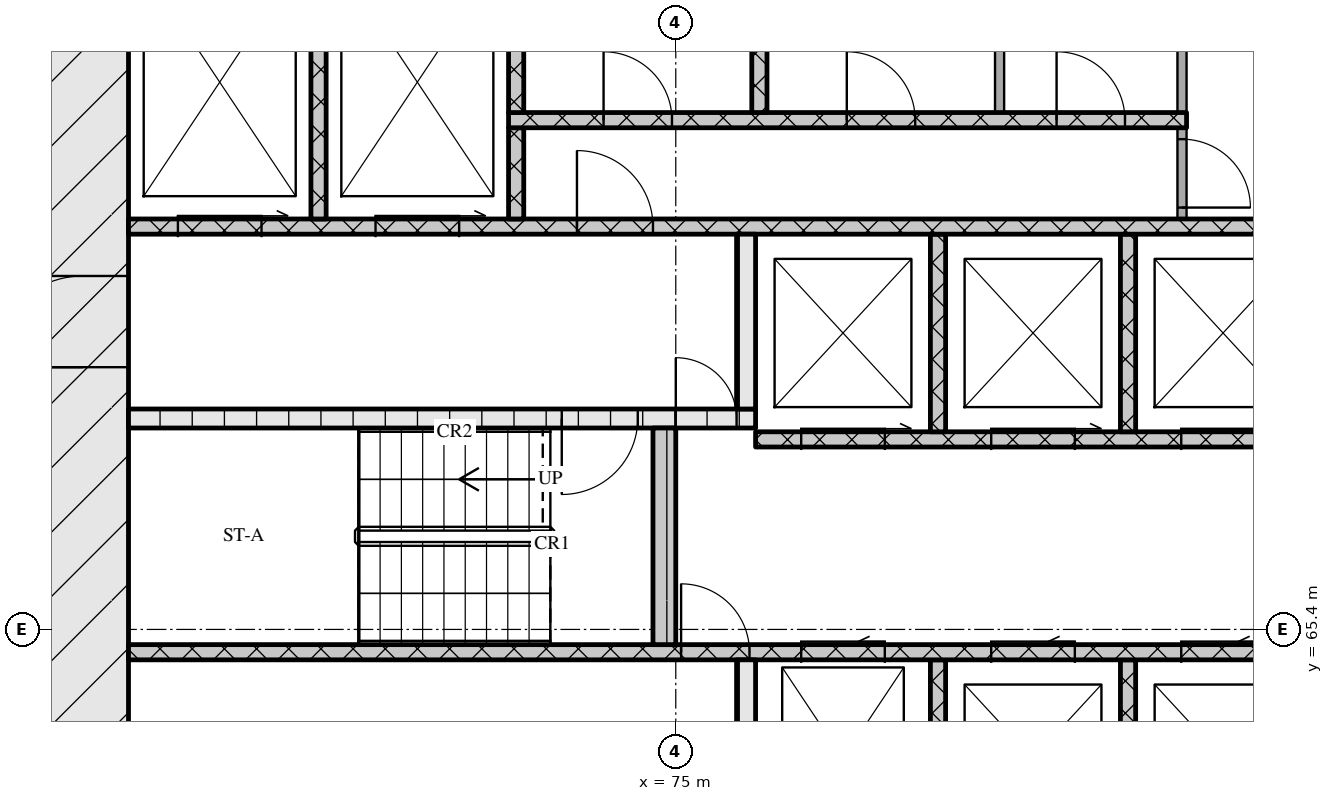
"""IFC4 building model, lengths in metres.
Left out: names, types, materials, properties, quantities, classifications, styles, units other than length and angle.
Written with IfcOpenShell. Run it as: python <this file> out.ifc"""

import sys

from ifc_helpers import new_model, si_unit, direction, frame, frame_2d, origin, place, context, subcontext, project, spatial, rectangle, extrude, element, fill, save


model = new_model("IFC4")
c1 = context("Model", 3, precision=1e-05, world=origin(), true_north=direction((0.0, 1.0)))
c2 = subcontext(c1, "Body", "Model", "MODEL_VIEW")
j1 = project(units=[si_unit("LENGTHUNIT", "METRE"), si_unit("PLANEANGLEUNIT", "RADIAN")], contexts=[c1])
p1 = place(None, origin())
s1 = spatial("IfcSite", under=j1, at=p1, CompositionType="ELEMENT")
p2 = place(p1, origin())
s2 = spatial("IfcBuilding", under=s1, at=p2, CompositionType="ELEMENT")
p3 = place(p2, frame((0.0, 0.0, 40.8)))
s3 = spatial("IfcBuildingStorey", under=s2, at=p3, CompositionType="ELEMENT", Elevation=40.8)
p4 = place(p3, frame((67.2, 62.4, 0.0), z_axis=(0.0, 0.0, 1.0), x_axis=(0.0, 1.0, 0.0)))
e1 = element("IfcWall", 1, at=p4, inside=s3, PredefinedType="SOLIDWALL", context=c2, shape_type="SweptSolid", body=[
    extrude(rectangle(XDim=12.0, YDim=1.2, at=frame_2d((6.0, 0.0))), origin(), (0.0, 0.0, 1.0), 3.32),
])
p5 = place(p4, frame((6.45, 0.0, 0.0)))
e2 = element("IfcOpeningElement", 2, at=p5, cuts=e1, PredefinedType="OPENING", context=c2, shape_type="SweptSolid", body=[
    extrude(rectangle(XDim=1.2, YDim=2.1, at=frame_2d((0.6, 1.05))), frame((0.0, 0.61, 0.0), z_axis=(0.0, -1.0, 0.0), x_axis=(1.0, 0.0, 0.0)), (0.0, 0.0, 1.0), 1.22),
])
p6 = place(p3, frame((75.925, 62.4, 0.0), z_axis=(0.0, 0.0, 1.0), x_axis=(0.0, 1.0, 0.0)))
e3 = element("IfcWall", 3, at=p6, inside=s3, PredefinedType="SOLIDWALL", context=c2, shape_type="SweptSolid", body=[
    extrude(rectangle(XDim=2.6, YDim=0.25, at=frame_2d((1.3, 0.0))), origin(), (0.0, 0.0, 1.0), 3.32),
])
for number, where, z_axis, x_axis in (
    (4, (78.45, 62.4, 0.0), (0.0, 0.0, 1.0), (0.0, 1.0, 0.0)),
    (5, (80.95, 62.4, 0.0), (0.0, 0.0, 1.0), (0.0, 1.0, 0.0)),
):
    element("IfcWall", number, at=place(p3, frame(where, z_axis=z_axis, x_axis=x_axis)), inside=s3, PredefinedType="SOLIDWALL", context=c2, shape_type="SweptSolid", body=[
        extrude(rectangle(XDim=2.6, YDim=0.2, at=frame_2d((1.3, 0.0))), origin(), (0.0, 0.0, 1.0), 3.32),
    ])
p7 = place(p3, frame((67.8, 65.1, 0.0), z_axis=(0.0, 0.0, 1.0), x_axis=(1.0, 0.0, 0.0)))
e6 = element("IfcWall", 6, at=p7, inside=s3, PredefinedType="SOLIDWALL", context=c2, shape_type="SweptSolid", body=[
    extrude(rectangle(XDim=18.5, YDim=0.2, at=frame_2d((9.25, 0.0))), origin(), (0.0, 0.0, 1.0), 3.32),
])
p8 = place(p7, frame((7.27, 0.0, 0.0)))
e7 = element("IfcOpeningElement", 7, at=p8, cuts=e6, PredefinedType="OPENING", context=c2, shape_type="SweptSolid", body=[
    extrude(rectangle(XDim=0.9, YDim=2.1, at=frame_2d((0.45, 1.05))), frame((0.0, 0.11, 0.0), z_axis=(0.0, -1.0, 0.0), x_axis=(1.0, 0.0, 0.0)), (0.0, 0.0, 1.0), 0.22),
])
p9 = place(p7, frame((8.85, 0.0, 0.0)))
e8 = element("IfcOpeningElement", 8, at=p9, cuts=e6, PredefinedType="OPENING", context=c2, shape_type="SweptSolid", body=[
    extrude(rectangle(XDim=1.1, YDim=2.1, at=frame_2d((0.55, 1.05))), frame((0.0, 0.11, 0.0), z_axis=(0.0, -1.0, 0.0), x_axis=(1.0, 0.0, 0.0)), (0.0, 0.0, 1.0), 0.22),
])
p10 = place(p7, frame((11.35, 0.0, 0.0)))
e9 = element("IfcOpeningElement", 9, at=p10, cuts=e6, PredefinedType="OPENING", context=c2, shape_type="SweptSolid", body=[
    extrude(rectangle(XDim=1.1, YDim=2.1, at=frame_2d((0.55, 1.05))), frame((0.0, 0.11, 0.0), z_axis=(0.0, -1.0, 0.0), x_axis=(1.0, 0.0, 0.0)), (0.0, 0.0, 1.0), 0.22),
])
p11 = place(p7, frame((13.85, 0.0, 0.0)))
e10 = element("IfcOpeningElement", 10, at=p11, cuts=e6, PredefinedType="OPENING", context=c2, shape_type="SweptSolid", body=[
    extrude(rectangle(XDim=1.1, YDim=2.1, at=frame_2d((0.55, 1.05))), frame((0.0, 0.11, 0.0), z_axis=(0.0, -1.0, 0.0), x_axis=(1.0, 0.0, 0.0)), (0.0, 0.0, 1.0), 0.22),
])
p12 = place(p7, frame((16.7, 0.0, 0.0)))
e11 = element("IfcOpeningElement", 11, at=p12, cuts=e6, PredefinedType="OPENING", context=c2, shape_type="SweptSolid", body=[
    extrude(rectangle(XDim=0.9, YDim=2.1, at=frame_2d((0.45, 1.05))), frame((0.0, 0.11, 0.0), z_axis=(0.0, -1.0, 0.0), x_axis=(1.0, 0.0, 0.0)), (0.0, 0.0, 1.0), 0.22),
])
p13 = place(p3, frame((74.85, 65.2, 0.0), z_axis=(0.0, 0.0, 1.0), x_axis=(0.0, 1.0, 0.0)))
e12 = element("IfcWall", 12, at=p13, inside=s3, PredefinedType="SOLIDWALL", context=c2, shape_type="SweptSolid", body=[
    extrude(rectangle(XDim=2.85, YDim=0.3, at=frame_2d((1.425, 0.0))), origin(), (0.0, 0.0, 1.0), 3.32),
])
p14 = place(p3, frame((76.05, 67.9, 0.0), z_axis=(0.0, 0.0, 1.0), x_axis=(1.0, 0.0, 0.0)))
e13 = element("IfcWall", 13, at=p14, inside=s3, PredefinedType="SOLIDWALL", context=c2, shape_type="SweptSolid", body=[
    extrude(rectangle(XDim=23.1, YDim=0.2, at=frame_2d((11.55, 0.0))), origin(), (0.0, 0.0, 1.0), 3.32),
])
p15 = place(p14, frame((0.6, 0.0, 0.0)))
e14 = element("IfcOpeningElement", 14, at=p15, cuts=e13, PredefinedType="OPENING", context=c2, shape_type="SweptSolid", body=[
    extrude(rectangle(XDim=1.1, YDim=2.1, at=frame_2d((0.55, 1.05))), frame((0.0, 0.11, 0.0), z_axis=(0.0, -1.0, 0.0), x_axis=(1.0, 0.0, 0.0)), (0.0, 0.0, 1.0), 0.22),
])
p16 = place(p14, frame((3.1, 0.0, 0.0)))
e15 = element("IfcOpeningElement", 15, at=p16, cuts=e13, PredefinedType="OPENING", context=c2, shape_type="SweptSolid", body=[
    extrude(rectangle(XDim=1.1, YDim=2.1, at=frame_2d((0.55, 1.05))), frame((0.0, 0.11, 0.0), z_axis=(0.0, -1.0, 0.0), x_axis=(1.0, 0.0, 0.0)), (0.0, 0.0, 1.0), 0.22),
])
p17 = place(p14, frame((5.6, 0.0, 0.0)))
e16 = element("IfcOpeningElement", 16, at=p17, cuts=e13, PredefinedType="OPENING", context=c2, shape_type="SweptSolid", body=[
    extrude(rectangle(XDim=1.1, YDim=2.1, at=frame_2d((0.55, 1.05))), frame((0.0, 0.11, 0.0), z_axis=(0.0, -1.0, 0.0), x_axis=(1.0, 0.0, 0.0)), (0.0, 0.0, 1.0), 0.22),
])
p18 = place(p14, frame((8.45, 0.0, 0.0)))
e17 = element("IfcOpeningElement", 17, at=p18, cuts=e13, PredefinedType="OPENING", context=c2, shape_type="SweptSolid", body=[
    extrude(rectangle(XDim=0.9, YDim=2.1, at=frame_2d((0.45, 1.05))), frame((0.0, 0.11, 0.0), z_axis=(0.0, -1.0, 0.0), x_axis=(1.0, 0.0, 0.0)), (0.0, 0.0, 1.0), 0.22),
])
p19 = place(p14, frame((10.91, 0.0, 0.0)))
e18 = element("IfcOpeningElement", 18, at=p19, cuts=e13, PredefinedType="OPENING", context=c2, shape_type="SweptSolid", body=[
    extrude(rectangle(XDim=0.9, YDim=2.1, at=frame_2d((0.45, 1.05))), frame((0.0, 0.11, 0.0), z_axis=(0.0, -1.0, 0.0), x_axis=(1.0, 0.0, 0.0)), (0.0, 0.0, 1.0), 0.22),
])
p20 = place(p14, frame((13.55, 0.0, 0.0)))
e19 = element("IfcOpeningElement", 19, at=p20, cuts=e13, PredefinedType="OPENING", context=c2, shape_type="SweptSolid", body=[
    extrude(rectangle(XDim=1.0, YDim=2.1, at=frame_2d((0.5, 1.05))), frame((0.0, 0.11, 0.0), z_axis=(0.0, -1.0, 0.0), x_axis=(1.0, 0.0, 0.0)), (0.0, 0.0, 1.0), 0.22),
])
for number, where, z_axis, x_axis in (
    (20, (78.45, 68.0, 0.0), (0.0, 0.0, 1.0), (0.0, 1.0, 0.0)),
    (21, (80.95, 68.0, 0.0), (0.0, 0.0, 1.0), (0.0, 1.0, 0.0)),
):
    element("IfcWall", number, at=place(p3, frame(where, z_axis=z_axis, x_axis=x_axis)), inside=s3, PredefinedType="SOLIDWALL", context=c2, shape_type="SweptSolid", body=[
        extrude(rectangle(XDim=2.6, YDim=0.2, at=frame_2d((1.3, 0.0))), origin(), (0.0, 0.0, 1.0), 3.32),
    ])
p21 = place(p3, frame((67.8, 68.175, 0.0), z_axis=(0.0, 0.0, 1.0), x_axis=(1.0, 0.0, 0.0)))
e22 = element("IfcWall", 22, at=p21, inside=s3, PredefinedType="SOLIDWALL", context=c2, shape_type="SweptSolid", body=[
    extrude(rectangle(XDim=8.25, YDim=0.25, at=frame_2d((4.125, 0.0))), origin(), (0.0, 0.0, 1.0), 3.32),
])
p22 = place(p21, frame((5.7, 0.0, 0.0)))
e23 = element("IfcOpeningElement", 23, at=p22, cuts=e22, PredefinedType="OPENING", context=c2, shape_type="SweptSolid", body=[
    extrude(rectangle(XDim=1.0, YDim=2.1, at=frame_2d((0.5, 1.05))), frame((0.0, 0.135, 0.0), z_axis=(0.0, -1.0, 0.0), x_axis=(1.0, 0.0, 0.0)), (0.0, 0.0, 1.0), 0.27),
])
p23 = place(p21, frame((7.2, 0.0, 0.0)))
e24 = element("IfcOpeningElement", 24, at=p23, cuts=e22, PredefinedType="OPENING", context=c2, shape_type="SweptSolid", body=[
    extrude(rectangle(XDim=0.8, YDim=2.1, at=frame_2d((0.4, 1.05))), frame((0.0, 0.135, 0.0), z_axis=(0.0, -1.0, 0.0), x_axis=(1.0, 0.0, 0.0)), (0.0, 0.0, 1.0), 0.27),
])
p24 = place(p3, frame((75.925, 68.3, 0.0), z_axis=(0.0, 0.0, 1.0), x_axis=(0.0, 1.0, 0.0)))
e25 = element("IfcWall", 25, at=p24, inside=s3, PredefinedType="SOLIDWALL", context=c2, shape_type="SweptSolid", body=[
    extrude(rectangle(XDim=2.3, YDim=0.25, at=frame_2d((1.15, 0.0))), origin(), (0.0, 0.0, 1.0), 3.32),
])
p25 = place(p3, frame((67.8, 70.7, 0.0), z_axis=(0.0, 0.0, 1.0), x_axis=(1.0, 0.0, 0.0)))
e26 = element("IfcWall", 26, at=p25, inside=s3, PredefinedType="SOLIDWALL", context=c2, shape_type="SweptSolid", body=[
    extrude(rectangle(XDim=39.6, YDim=0.2, at=frame_2d((19.8, 0.0))), origin(), (0.0, 0.0, 1.0), 3.32),
])
p26 = place(p25, frame((0.65, 0.0, 0.0)))
e27 = element("IfcOpeningElement", 27, at=p26, cuts=e26, PredefinedType="OPENING", context=c2, shape_type="SweptSolid", body=[
    extrude(rectangle(XDim=1.1, YDim=2.1, at=frame_2d((0.55, 1.05))), frame((0.0, 0.11, 0.0), z_axis=(0.0, -1.0, 0.0), x_axis=(1.0, 0.0, 0.0)), (0.0, 0.0, 1.0), 0.22),
])
p27 = place(p25, frame((3.25, 0.0, 0.0)))
e28 = element("IfcOpeningElement", 28, at=p27, cuts=e26, PredefinedType="OPENING", context=c2, shape_type="SweptSolid", body=[
    extrude(rectangle(XDim=1.1, YDim=2.1, at=frame_2d((0.55, 1.05))), frame((0.0, 0.11, 0.0), z_axis=(0.0, -1.0, 0.0), x_axis=(1.0, 0.0, 0.0)), (0.0, 0.0, 1.0), 0.22),
])
p28 = place(p25, frame((5.9, 0.0, 0.0)))
e29 = element("IfcOpeningElement", 29, at=p28, cuts=e26, PredefinedType="OPENING", context=c2, shape_type="SweptSolid", body=[
    extrude(rectangle(XDim=1.0, YDim=2.1, at=frame_2d((0.5, 1.05))), frame((0.0, 0.11, 0.0), z_axis=(0.0, -1.0, 0.0), x_axis=(1.0, 0.0, 0.0)), (0.0, 0.0, 1.0), 0.22),
])
p29 = place(p25, frame((21.7, 0.0, 0.0)))
e30 = element("IfcOpeningElement", 30, at=p29, cuts=e26, PredefinedType="OPENING", context=c2, shape_type="SweptSolid", body=[
    extrude(rectangle(XDim=1.0, YDim=2.1, at=frame_2d((0.5, 1.05))), frame((0.0, 0.11, 0.0), z_axis=(0.0, -1.0, 0.0), x_axis=(1.0, 0.0, 0.0)), (0.0, 0.0, 1.0), 0.22),
])
p30 = place(p25, frame((32.7, 0.0, 0.0)))
e31 = element("IfcOpeningElement", 31, at=p30, cuts=e26, PredefinedType="OPENING", context=c2, shape_type="SweptSolid", body=[
    extrude(rectangle(XDim=1.0, YDim=2.1, at=frame_2d((0.5, 1.05))), frame((0.0, 0.11, 0.0), z_axis=(0.0, -1.0, 0.0), x_axis=(1.0, 0.0, 0.0)), (0.0, 0.0, 1.0), 0.22),
])
p31 = place(p25, frame((35.25, 0.0, 0.0)))
e32 = element("IfcOpeningElement", 32, at=p31, cuts=e26, PredefinedType="OPENING", context=c2, shape_type="SweptSolid", body=[
    extrude(rectangle(XDim=1.1, YDim=2.1, at=frame_2d((0.55, 1.05))), frame((0.0, 0.11, 0.0), z_axis=(0.0, -1.0, 0.0), x_axis=(1.0, 0.0, 0.0)), (0.0, 0.0, 1.0), 0.22),
])
p32 = place(p25, frame((37.85, 0.0, 0.0)))
e33 = element("IfcOpeningElement", 33, at=p32, cuts=e26, PredefinedType="OPENING", context=c2, shape_type="SweptSolid", body=[
    extrude(rectangle(XDim=1.1, YDim=2.1, at=frame_2d((0.55, 1.05))), frame((0.0, 0.11, 0.0), z_axis=(0.0, -1.0, 0.0), x_axis=(1.0, 0.0, 0.0)), (0.0, 0.0, 1.0), 0.22),
])
p33 = place(p3, frame((70.3, 70.8, 0.0), z_axis=(0.0, 0.0, 1.0), x_axis=(0.0, 1.0, 0.0)))
e34 = element("IfcWall", 34, at=p33, inside=s3, PredefinedType="SOLIDWALL", context=c2, shape_type="SweptSolid", body=[
    extrude(rectangle(XDim=3.6, YDim=0.2, at=frame_2d((1.8, 0.0))), origin(), (0.0, 0.0, 1.0), 3.32),
])
p34 = place(p3, frame((72.9, 70.8, 0.0), z_axis=(0.0, 0.0, 1.0), x_axis=(0.0, 1.0, 0.0)))
e35 = element("IfcWall", 35, at=p34, inside=s3, PredefinedType="SOLIDWALL", context=c2, shape_type="SweptSolid", body=[
    extrude(rectangle(XDim=1.2, YDim=0.2, at=frame_2d((0.6, 0.0))), origin(), (0.0, 0.0, 1.0), 3.32),
])
p35 = place(p3, frame((81.66, 70.8, 0.0), z_axis=(0.0, 0.0, 1.0), x_axis=(0.0, 1.0, 0.0)))
e36 = element("IfcWall", 36, at=p35, inside=s3, PredefinedType="PARTITIONING", context=c2, shape_type="SweptSolid", body=[
    extrude(rectangle(XDim=1.2, YDim=0.12, at=frame_2d((0.6, 0.0))), origin(), (0.0, 0.0, 1.0), 3.32),
])
p36 = place(p35, frame((0.15, 0.0, 0.0)))
e37 = element("IfcOpeningElement", 37, at=p36, cuts=e36, PredefinedType="OPENING", context=c2, shape_type="SweptSolid", body=[
    extrude(rectangle(XDim=0.9, YDim=2.1, at=frame_2d((0.45, 1.05))), frame((0.0, 0.07, 0.0), z_axis=(0.0, -1.0, 0.0), x_axis=(1.0, 0.0, 0.0)), (0.0, 0.0, 1.0), 0.14),
])
p37 = place(p3, frame((72.8, 72.1, 0.0), z_axis=(0.0, 0.0, 1.0), x_axis=(1.0, 0.0, 0.0)))
e38 = element("IfcWall", 38, at=p37, inside=s3, PredefinedType="SOLIDWALL", context=c2, shape_type="SweptSolid", body=[
    extrude(rectangle(XDim=8.92, YDim=0.2, at=frame_2d((4.46, 0.0))), origin(), (0.0, 0.0, 1.0), 3.32),
])
p38 = place(p37, frame((1.25, 0.0, 0.0)))
e39 = element("IfcOpeningElement", 39, at=p38, cuts=e38, PredefinedType="OPENING", context=c2, shape_type="SweptSolid", body=[
    extrude(rectangle(XDim=0.9, YDim=2.1, at=frame_2d((0.45, 1.05))), frame((0.0, 0.11, 0.0), z_axis=(0.0, -1.0, 0.0), x_axis=(1.0, 0.0, 0.0)), (0.0, 0.0, 1.0), 0.22),
])
p39 = place(p37, frame((4.45, 0.0, 0.0)))
e40 = element("IfcOpeningElement", 40, at=p39, cuts=e38, PredefinedType="OPENING", context=c2, shape_type="SweptSolid", body=[
    extrude(rectangle(XDim=0.9, YDim=2.1, at=frame_2d((0.45, 1.05))), frame((0.0, 0.11, 0.0), z_axis=(0.0, -1.0, 0.0), x_axis=(1.0, 0.0, 0.0)), (0.0, 0.0, 1.0), 0.22),
])
p40 = place(p37, frame((7.21, 0.0, 0.0)))
e41 = element("IfcOpeningElement", 41, at=p40, cuts=e38, PredefinedType="OPENING", context=c2, shape_type="SweptSolid", body=[
    extrude(rectangle(XDim=0.9, YDim=2.1, at=frame_2d((0.45, 1.05))), frame((0.0, 0.11, 0.0), z_axis=(0.0, -1.0, 0.0), x_axis=(1.0, 0.0, 0.0)), (0.0, 0.0, 1.0), 0.22),
])
for number, where, z_axis, x_axis in (
    (42, (72.9, 72.2, 0.0), (0.0, 0.0, 1.0), (0.0, 1.0, 0.0)),
    (43, (76.1, 72.2, 0.0), (0.0, 0.0, 1.0), (0.0, 1.0, 0.0)),
):
    element("IfcWall", number, at=place(p3, frame(where, z_axis=z_axis, x_axis=x_axis)), inside=s3, PredefinedType="SOLIDWALL", context=c2, shape_type="SweptSolid", body=[
        extrude(rectangle(XDim=2.2, YDim=0.2, at=frame_2d((1.1, 0.0))), origin(), (0.0, 0.0, 1.0), 3.32),
    ])
for number, where, z_axis, x_axis in (
    (44, (79.26, 72.2, 0.0), (0.0, 0.0, 1.0), (0.0, 1.0, 0.0)),
    (45, (81.66, 72.2, 0.0), (0.0, 0.0, 1.0), (0.0, 1.0, 0.0)),
):
    element("IfcWall", number, at=place(p3, frame(where, z_axis=z_axis, x_axis=x_axis)), inside=s3, PredefinedType="PARTITIONING", context=c2, shape_type="SweptSolid", body=[
        extrude(rectangle(XDim=2.2, YDim=0.12, at=frame_2d((1.1, 0.0))), origin(), (0.0, 0.0, 1.0), 3.32),
    ])
p41 = place(p8, origin())
e46 = element("IfcDoor", 46, at=p41, inside=s3, OperationType="SINGLE_SWING_LEFT", PredefinedType="DOOR", context=c2, shape_type="SweptSolid", body=[
    extrude(rectangle(XDim=0.9, YDim=2.1, at=frame_2d((0.45, 1.05))), frame((0.0, 0.025, 0.0), z_axis=(0.0, -1.0, 0.0), x_axis=(1.0, 0.0, 0.0)), (0.0, 0.0, 1.0), 0.05),
])
fill(e7, e46)
p42 = place(p9, origin())
e47 = element("IfcDoor", 47, at=p42, inside=s3, OperationType="SLIDING_TO_LEFT", PredefinedType="DOOR", context=c2, shape_type="SweptSolid", body=[
    extrude(rectangle(XDim=1.1, YDim=2.1, at=frame_2d((0.55, 1.05))), frame((0.0, 0.025, 0.0), z_axis=(0.0, -1.0, 0.0), x_axis=(1.0, 0.0, 0.0)), (0.0, 0.0, 1.0), 0.05),
])
fill(e8, e47)
p43 = place(p10, origin())
e48 = element("IfcDoor", 48, at=p43, inside=s3, OperationType="SLIDING_TO_LEFT", PredefinedType="DOOR", context=c2, shape_type="SweptSolid", body=[
    extrude(rectangle(XDim=1.1, YDim=2.1, at=frame_2d((0.55, 1.05))), frame((0.0, 0.025, 0.0), z_axis=(0.0, -1.0, 0.0), x_axis=(1.0, 0.0, 0.0)), (0.0, 0.0, 1.0), 0.05),
])
fill(e9, e48)
p44 = place(p11, origin())
e49 = element("IfcDoor", 49, at=p44, inside=s3, OperationType="SLIDING_TO_LEFT", PredefinedType="DOOR", context=c2, shape_type="SweptSolid", body=[
    extrude(rectangle(XDim=1.1, YDim=2.1, at=frame_2d((0.55, 1.05))), frame((0.0, 0.025, 0.0), z_axis=(0.0, -1.0, 0.0), x_axis=(1.0, 0.0, 0.0)), (0.0, 0.0, 1.0), 0.05),
])
fill(e10, e49)
p45 = place(p15, origin())
e50 = element("IfcDoor", 50, at=p45, inside=s3, OperationType="SLIDING_TO_RIGHT", PredefinedType="DOOR", context=c2, shape_type="SweptSolid", body=[
    extrude(rectangle(XDim=1.1, YDim=2.1, at=frame_2d((0.55, 1.05))), frame((0.0, 0.025, 0.0), z_axis=(0.0, -1.0, 0.0), x_axis=(1.0, 0.0, 0.0)), (0.0, 0.0, 1.0), 0.05),
])
fill(e14, e50)
p46 = place(p16, origin())
e51 = element("IfcDoor", 51, at=p46, inside=s3, OperationType="SLIDING_TO_RIGHT", PredefinedType="DOOR", context=c2, shape_type="SweptSolid", body=[
    extrude(rectangle(XDim=1.1, YDim=2.1, at=frame_2d((0.55, 1.05))), frame((0.0, 0.025, 0.0), z_axis=(0.0, -1.0, 0.0), x_axis=(1.0, 0.0, 0.0)), (0.0, 0.0, 1.0), 0.05),
])
fill(e15, e51)
p47 = place(p17, origin())
e52 = element("IfcDoor", 52, at=p47, inside=s3, OperationType="SLIDING_TO_RIGHT", PredefinedType="DOOR", context=c2, shape_type="SweptSolid", body=[
    extrude(rectangle(XDim=1.1, YDim=2.1, at=frame_2d((0.55, 1.05))), frame((0.0, 0.025, 0.0), z_axis=(0.0, -1.0, 0.0), x_axis=(1.0, 0.0, 0.0)), (0.0, 0.0, 1.0), 0.05),
])
fill(e16, e52)
p48 = place(p22, origin())
e53 = element("IfcDoor", 53, at=p48, inside=s3, OperationType="SINGLE_SWING_RIGHT", PredefinedType="DOOR", context=c2, shape_type="SweptSolid", body=[
    extrude(rectangle(XDim=1.0, YDim=2.1, at=frame_2d((0.5, 1.05))), frame((0.0, 0.025, 0.0), z_axis=(0.0, -1.0, 0.0), x_axis=(1.0, 0.0, 0.0)), (0.0, 0.0, 1.0), 0.05),
])
fill(e23, e53)
p49 = place(p23, origin())
e54 = element("IfcDoor", 54, at=p49, inside=s3, OperationType="SINGLE_SWING_LEFT", PredefinedType="DOOR", context=c2, shape_type="SweptSolid", body=[
    extrude(rectangle(XDim=0.8, YDim=2.1, at=frame_2d((0.4, 1.05))), frame((0.0, 0.025, 0.0), z_axis=(0.0, -1.0, 0.0), x_axis=(1.0, 0.0, 0.0)), (0.0, 0.0, 1.0), 0.05),
])
fill(e24, e54)
p50 = place(p5, origin())
e55 = element("IfcDoor", 55, at=p50, inside=s3, OperationType="SINGLE_SWING_LEFT", PredefinedType="DOOR", context=c2, shape_type="SweptSolid", body=[
    extrude(rectangle(XDim=1.2, YDim=2.1, at=frame_2d((0.6, 1.05))), frame((0.0, 0.025, 0.0), z_axis=(0.0, -1.0, 0.0), x_axis=(1.0, 0.0, 0.0)), (0.0, 0.0, 1.0), 0.05),
])
fill(e2, e55)
p51 = place(p26, origin())
e56 = element("IfcDoor", 56, at=p51, inside=s3, OperationType="SLIDING_TO_RIGHT", PredefinedType="DOOR", context=c2, shape_type="SweptSolid", body=[
    extrude(rectangle(XDim=1.1, YDim=2.1, at=frame_2d((0.55, 1.05))), frame((0.0, 0.025, 0.0), z_axis=(0.0, -1.0, 0.0), x_axis=(1.0, 0.0, 0.0)), (0.0, 0.0, 1.0), 0.05),
])
fill(e27, e56)
p52 = place(p27, origin())
e57 = element("IfcDoor", 57, at=p52, inside=s3, OperationType="SLIDING_TO_RIGHT", PredefinedType="DOOR", context=c2, shape_type="SweptSolid", body=[
    extrude(rectangle(XDim=1.1, YDim=2.1, at=frame_2d((0.55, 1.05))), frame((0.0, 0.025, 0.0), z_axis=(0.0, -1.0, 0.0), x_axis=(1.0, 0.0, 0.0)), (0.0, 0.0, 1.0), 0.05),
])
fill(e28, e57)
p53 = place(p28, origin())
e58 = element("IfcDoor", 58, at=p53, inside=s3, OperationType="SINGLE_SWING_LEFT", PredefinedType="DOOR", context=c2, shape_type="SweptSolid", body=[
    extrude(rectangle(XDim=1.0, YDim=2.1, at=frame_2d((0.5, 1.05))), frame((0.0, 0.025, 0.0), z_axis=(0.0, -1.0, 0.0), x_axis=(1.0, 0.0, 0.0)), (0.0, 0.0, 1.0), 0.05),
])
fill(e29, e58)
p54 = place(p36, origin())
e59 = element("IfcDoor", 59, at=p54, inside=s3, OperationType="SINGLE_SWING_RIGHT", PredefinedType="DOOR", context=c2, shape_type="SweptSolid", body=[
    extrude(rectangle(XDim=0.9, YDim=2.1, at=frame_2d((0.45, 1.05))), frame((0.0, 0.025, 0.0), z_axis=(0.0, -1.0, 0.0), x_axis=(1.0, 0.0, 0.0)), (0.0, 0.0, 1.0), 0.05),
])
fill(e37, e59)
p55 = place(p38, origin())
e60 = element("IfcDoor", 60, at=p55, inside=s3, OperationType="SINGLE_SWING_LEFT", PredefinedType="DOOR", context=c2, shape_type="SweptSolid", body=[
    extrude(rectangle(XDim=0.9, YDim=2.1, at=frame_2d((0.45, 1.05))), frame((0.0, 0.025, 0.0), z_axis=(0.0, -1.0, 0.0), x_axis=(1.0, 0.0, 0.0)), (0.0, 0.0, 1.0), 0.05),
])
fill(e39, e60)
p56 = place(p39, origin())
e61 = element("IfcDoor", 61, at=p56, inside=s3, OperationType="SINGLE_SWING_LEFT", PredefinedType="DOOR", context=c2, shape_type="SweptSolid", body=[
    extrude(rectangle(XDim=0.9, YDim=2.1, at=frame_2d((0.45, 1.05))), frame((0.0, 0.025, 0.0), z_axis=(0.0, -1.0, 0.0), x_axis=(1.0, 0.0, 0.0)), (0.0, 0.0, 1.0), 0.05),
])
fill(e40, e61)
p57 = place(p40, origin())
e62 = element("IfcDoor", 62, at=p57, inside=s3, OperationType="SINGLE_SWING_LEFT", PredefinedType="DOOR", context=c2, shape_type="SweptSolid", body=[
    extrude(rectangle(XDim=0.9, YDim=2.1, at=frame_2d((0.45, 1.05))), frame((0.0, 0.025, 0.0), z_axis=(0.0, -1.0, 0.0), x_axis=(1.0, 0.0, 0.0)), (0.0, 0.0, 1.0), 0.05),
])
fill(e41, e62)
save(model, sys.argv[1])
